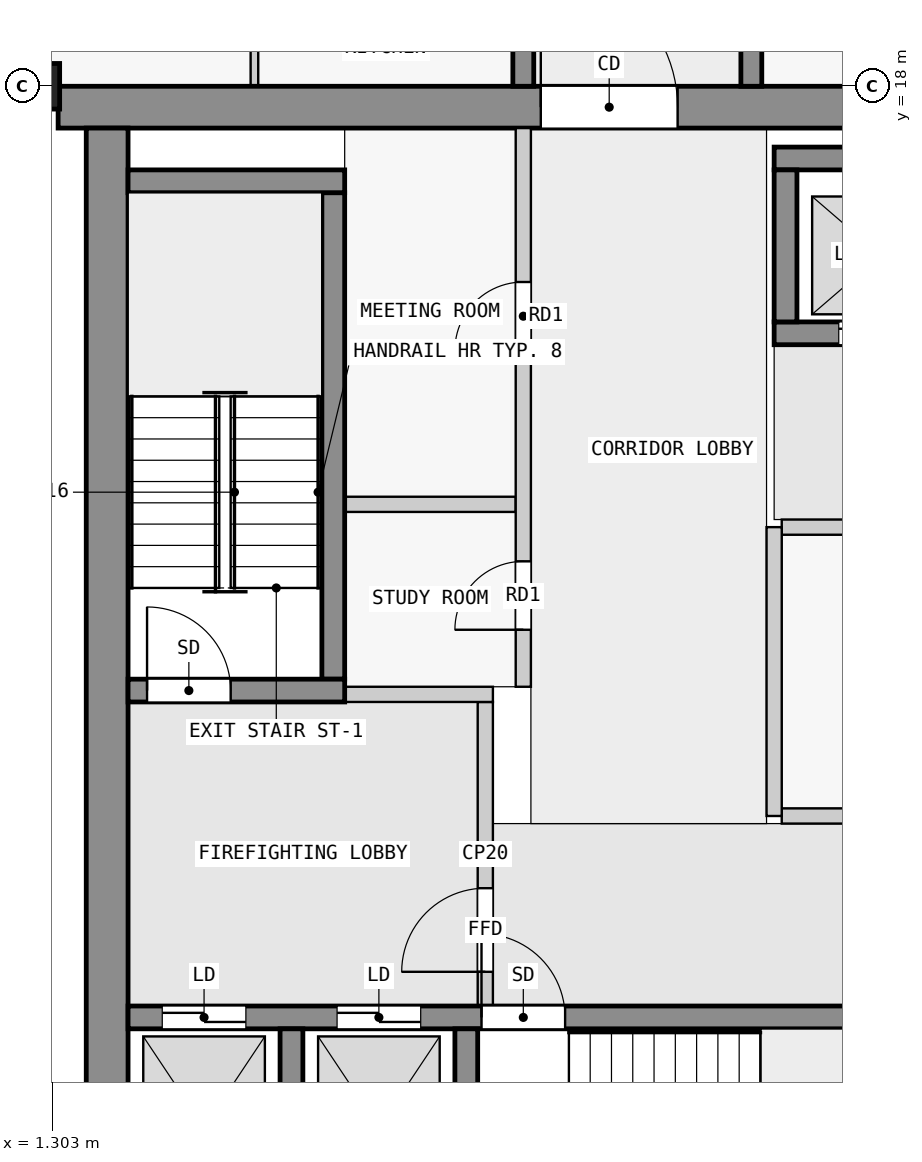
"""IFC4 building model, lengths in metres.
Left out: names, types, materials, properties, quantities, classifications, styles, units other than length and angle.
Written with IfcOpenShell. Run it as: python <this file> out.ifc"""

import sys

from ifc_helpers import new_model, si_unit, direction, frame, frame_2d, origin, origin_2d, place, context, subcontext, project, spatial, rectangle, extrude, element, fill, save


model = new_model("IFC4")
c1 = context("Model", 3, precision=1e-05, world=origin(), true_north=direction((0.0, 1.0)))
c2 = subcontext(c1, "Body", "Model", "MODEL_VIEW")
j1 = project(units=[si_unit("LENGTHUNIT", "METRE"), si_unit("PLANEANGLEUNIT", "RADIAN")], contexts=[c1])
p1 = place(None, origin())
s1 = spatial("IfcSite", under=j1, at=p1, CompositionType="ELEMENT")
p2 = place(p1, origin())
s2 = spatial("IfcBuilding", under=s1, at=p2, CompositionType="ELEMENT")
p3 = place(p2, frame((0.0, 0.0, 208.4)))
s3 = spatial("IfcBuildingStorey", under=s2, at=p3, CompositionType="ELEMENT", Elevation=208.4)
p4 = place(p3, frame((0.7, 18.0, 0.0), z_axis=(0.0, 0.0, 1.0), x_axis=(0.0, 1.0, 0.0)))
e1 = element("IfcColumn", 1, at=p4, inside=s3, PredefinedType="COLUMN", context=c2, shape_type="SweptSolid", body=[
    extrude(rectangle(XDim=0.6, YDim=1.4, at=origin_2d()), origin(), (0.0, 0.0, 1.0), 3.5),
])
p5 = place(p3, frame((1.38, 17.725, 0.0), z_axis=(0.0, 0.0, 1.0), x_axis=(1.0, 0.0, 0.0)))
e2 = element("IfcWall", 2, at=p5, inside=s3, PredefinedType="SHEAR", context=c2, shape_type="SweptSolid", body=[
    extrude(rectangle(XDim=21.12, YDim=0.55, at=frame_2d((10.56, 0.0))), origin(), (0.0, 0.0, 1.0), 3.25),
])
p6 = place(p5, frame((6.35, 0.0, 0.0)))
e3 = element("IfcOpeningElement", 3, at=p6, cuts=e2, PredefinedType="OPENING", context=c2, shape_type="SweptSolid", body=[
    extrude(rectangle(XDim=1.8, YDim=2.1, at=frame_2d((0.9, 1.05))), frame((0.0, 0.285, 0.0), z_axis=(0.0, -1.0, 0.0), x_axis=(1.0, 0.0, 0.0)), (0.0, 0.0, 1.0), 0.57),
])
p7 = place(p3, frame((2.025, 2.5, 0.0), z_axis=(0.0, 0.0, 1.0), x_axis=(0.0, 1.0, 0.0)))
e4 = element("IfcWall", 4, at=p7, inside=s3, PredefinedType="SHEAR", context=c2, shape_type="SweptSolid", body=[
    extrude(rectangle(XDim=14.95, YDim=0.55, at=frame_2d((7.475, 0.0))), origin(), (0.0, 0.0, 1.0), 3.25),
])
for number, where, z_axis, x_axis in (
    (5, (4.45, 2.8, 0.0), (0.0, 0.0, 1.0), (0.0, 1.0, 0.0)),
    (6, (6.75, 2.8, 0.0), (0.0, 0.0, 1.0), (0.0, 1.0, 0.0)),
):
    element("IfcWall", number, at=place(p3, frame(where, z_axis=z_axis, x_axis=x_axis)), inside=s3, PredefinedType="SHEAR", context=c2, shape_type="SweptSolid", body=[
        extrude(rectangle(XDim=2.8, YDim=0.3, at=frame_2d((1.4, 0.0))), origin(), (0.0, 0.0, 1.0), 3.25),
    ])
p8 = place(p3, frame((2.3, 5.75, 0.0), z_axis=(0.0, 0.0, 1.0), x_axis=(1.0, 0.0, 0.0)))
e7 = element("IfcWall", 7, at=p8, inside=s3, PredefinedType="SHEAR", context=c2, shape_type="SweptSolid", body=[
    extrude(rectangle(XDim=18.8, YDim=0.3, at=frame_2d((9.4, 0.0))), origin(), (0.0, 0.0, 1.0), 3.25),
])
p9 = place(p8, frame((4.65, 0.0, 0.0)))
e8 = element("IfcOpeningElement", 8, at=p9, cuts=e7, PredefinedType="OPENING", context=c2, shape_type="SweptSolid", body=[
    extrude(rectangle(XDim=1.1, YDim=2.1, at=frame_2d((0.55, 1.05))), frame((0.0, 0.16, 0.0), z_axis=(0.0, -1.0, 0.0), x_axis=(1.0, 0.0, 0.0)), (0.0, 0.0, 1.0), 0.32),
])
p10 = place(p8, frame((0.45, 0.0, 0.0)))
e9 = element("IfcOpeningElement", 9, at=p10, cuts=e7, PredefinedType="OPENING", context=c2, shape_type="SweptSolid", body=[
    extrude(rectangle(XDim=1.1, YDim=2.1, at=frame_2d((0.55, 1.05))), frame((0.0, 0.16, 0.0), z_axis=(0.0, -1.0, 0.0), x_axis=(1.0, 0.0, 0.0)), (0.0, 0.0, 1.0), 0.32),
])
p11 = place(p8, frame((2.75, 0.0, 0.0)))
e10 = element("IfcOpeningElement", 10, at=p11, cuts=e7, PredefinedType="OPENING", context=c2, shape_type="SweptSolid", body=[
    extrude(rectangle(XDim=1.1, YDim=2.1, at=frame_2d((0.55, 1.05))), frame((0.0, 0.16, 0.0), z_axis=(0.0, -1.0, 0.0), x_axis=(1.0, 0.0, 0.0)), (0.0, 0.0, 1.0), 0.32),
])
p12 = place(p8, frame((13.2, 0.0, 0.0)))
e11 = element("IfcOpeningElement", 11, at=p12, cuts=e7, PredefinedType="OPENING", context=c2, shape_type="SweptSolid", body=[
    extrude(rectangle(XDim=0.9, YDim=2.1, at=frame_2d((0.45, 1.05))), frame((0.0, 0.16, 0.0), z_axis=(0.0, -1.0, 0.0), x_axis=(1.0, 0.0, 0.0)), (0.0, 0.0, 1.0), 0.32),
])
p13 = place(p8, frame((16.95, 0.0, 0.0)))
e12 = element("IfcOpeningElement", 12, at=p13, cuts=e7, PredefinedType="OPENING", context=c2, shape_type="SweptSolid", body=[
    extrude(rectangle(XDim=0.9, YDim=2.1, at=frame_2d((0.45, 1.05))), frame((0.0, 0.16, 0.0), z_axis=(0.0, -1.0, 0.0), x_axis=(1.0, 0.0, 0.0)), (0.0, 0.0, 1.0), 0.32),
])
p14 = place(p3, frame((2.3, 10.05, 0.0), z_axis=(0.0, 0.0, 1.0), x_axis=(1.0, 0.0, 0.0)))
e13 = element("IfcWall", 13, at=p14, inside=s3, PredefinedType="SHEAR", context=c2, shape_type="SweptSolid", body=[
    extrude(rectangle(XDim=2.85, YDim=0.3, at=frame_2d((1.425, 0.0))), origin(), (0.0, 0.0, 1.0), 3.25),
])
p15 = place(p14, frame((0.25, 0.0, 0.0)))
e14 = element("IfcOpeningElement", 14, at=p15, cuts=e13, PredefinedType="OPENING", context=c2, shape_type="SweptSolid", body=[
    extrude(rectangle(XDim=1.1, YDim=2.1, at=frame_2d((0.55, 1.05))), frame((0.0, 0.16, 0.0), z_axis=(0.0, -1.0, 0.0), x_axis=(1.0, 0.0, 0.0)), (0.0, 0.0, 1.0), 0.32),
])
p16 = place(p3, frame((5.0, 10.2, 0.0), z_axis=(0.0, 0.0, 1.0), x_axis=(0.0, 1.0, 0.0)))
e15 = element("IfcWall", 15, at=p16, inside=s3, PredefinedType="SHEAR", context=c2, shape_type="SweptSolid", body=[
    extrude(rectangle(XDim=6.4, YDim=0.3, at=frame_2d((3.2, 0.0))), origin(), (0.0, 0.0, 1.0), 3.25),
])
p17 = place(p3, frame((2.3, 16.75, 0.0), z_axis=(0.0, 0.0, 1.0), x_axis=(1.0, 0.0, 0.0)))
e16 = element("IfcWall", 16, at=p17, inside=s3, PredefinedType="SHEAR", context=c2, shape_type="SweptSolid", body=[
    extrude(rectangle(XDim=2.85, YDim=0.3, at=frame_2d((1.425, 0.0))), origin(), (0.0, 0.0, 1.0), 3.25),
])
p18 = place(p3, frame((10.8, 17.05, 0.0), z_axis=(0.0, 0.0, 1.0), x_axis=(1.0, 0.0, 0.0)))
e17 = element("IfcWall", 17, at=p18, inside=s3, PredefinedType="SHEAR", context=c2, shape_type="SweptSolid", body=[
    extrude(rectangle(XDim=7.8, YDim=0.3, at=frame_2d((3.9, 0.0))), origin(), (0.0, 0.0, 1.0), 3.25),
])
p19 = place(p3, frame((10.8, 14.75, 0.0), z_axis=(0.0, 0.0, 1.0), x_axis=(1.0, 0.0, 0.0)))
e18 = element("IfcWall", 18, at=p19, inside=s3, PredefinedType="SHEAR", context=c2, shape_type="SweptSolid", body=[
    extrude(rectangle(XDim=7.8, YDim=0.3, at=frame_2d((3.9, 0.0))), origin(), (0.0, 0.0, 1.0), 3.25),
])
p20 = place(p19, frame((0.85, 0.0, 0.0)))
e19 = element("IfcOpeningElement", 19, at=p20, cuts=e18, PredefinedType="OPENING", context=c2, shape_type="SweptSolid", body=[
    extrude(rectangle(XDim=1.1, YDim=2.1, at=frame_2d((0.55, 1.05))), frame((0.0, 0.16, 0.0), z_axis=(0.0, -1.0, 0.0), x_axis=(1.0, 0.0, 0.0)), (0.0, 0.0, 1.0), 0.32),
])
p21 = place(p19, frame((3.35, 0.0, 0.0)))
e20 = element("IfcOpeningElement", 20, at=p21, cuts=e18, PredefinedType="OPENING", context=c2, shape_type="SweptSolid", body=[
    extrude(rectangle(XDim=1.1, YDim=2.1, at=frame_2d((0.55, 1.05))), frame((0.0, 0.16, 0.0), z_axis=(0.0, -1.0, 0.0), x_axis=(1.0, 0.0, 0.0)), (0.0, 0.0, 1.0), 0.32),
])
p22 = place(p19, frame((5.85, 0.0, 0.0)))
e21 = element("IfcOpeningElement", 21, at=p22, cuts=e18, PredefinedType="OPENING", context=c2, shape_type="SweptSolid", body=[
    extrude(rectangle(XDim=1.1, YDim=2.1, at=frame_2d((0.55, 1.05))), frame((0.0, 0.16, 0.0), z_axis=(0.0, -1.0, 0.0), x_axis=(1.0, 0.0, 0.0)), (0.0, 0.0, 1.0), 0.32),
])
p23 = place(p3, frame((10.95, 14.9, 0.0), z_axis=(0.0, 0.0, 1.0), x_axis=(0.0, 1.0, 0.0)))
e22 = element("IfcWall", 22, at=p23, inside=s3, PredefinedType="SHEAR", context=c2, shape_type="SweptSolid", body=[
    extrude(rectangle(XDim=2.0, YDim=0.3, at=frame_2d((1.0, 0.0))), origin(), (0.0, 0.0, 1.0), 3.25),
])
p24 = place(p3, frame((7.5, 18.0, 0.0), z_axis=(0.0, 0.0, 1.0), x_axis=(0.0, 1.0, 0.0)))
e23 = element("IfcWall", 23, at=p24, inside=s3, PredefinedType="SHEAR", context=c2, shape_type="SweptSolid", body=[
    extrude(rectangle(XDim=27.0, YDim=0.275, at=frame_2d((13.5, 0.0))), origin(), (0.0, 0.0, 1.0), 3.25),
])
p25 = place(p24, frame((1.75, 0.0, 0.0)))
e24 = element("IfcOpeningElement", 24, at=p25, cuts=e23, PredefinedType="OPENING", context=c2, shape_type="SweptSolid", body=[
    extrude(rectangle(XDim=1.0, YDim=2.1, at=frame_2d((0.5, 1.05))), frame((0.0, 0.147, 0.0), z_axis=(0.0, -1.0, 0.0), x_axis=(1.0, 0.0, 0.0)), (0.0, 0.0, 1.0), 0.295),
])
p26 = place(p24, frame((5.85, 0.0, 0.0)))
e25 = element("IfcOpeningElement", 25, at=p26, cuts=e23, PredefinedType="OPENING", context=c2, shape_type="SweptSolid", body=[
    extrude(rectangle(XDim=1.8, YDim=2.1, at=frame_2d((0.9, 1.05))), frame((0.0, 0.147, 0.0), z_axis=(0.0, -1.0, 0.0), x_axis=(1.0, 0.0, 0.0)), (0.0, 0.0, 1.0), 0.295),
])
p27 = place(p24, frame((13.05, 0.0, 0.0)))
e26 = element("IfcOpeningElement", 26, at=p27, cuts=e23, PredefinedType="OPENING", context=c2, shape_type="SweptSolid", body=[
    extrude(rectangle(XDim=1.0, YDim=2.1, at=frame_2d((0.5, 1.05))), frame((0.0, 0.147, 0.0), z_axis=(0.0, -1.0, 0.0), x_axis=(1.0, 0.0, 0.0)), (0.0, 0.0, 1.0), 0.295),
])
p28 = place(p24, frame((19.75, 0.0, 0.0)))
e27 = element("IfcOpeningElement", 27, at=p28, cuts=e23, PredefinedType="OPENING", context=c2, shape_type="SweptSolid", body=[
    extrude(rectangle(XDim=1.0, YDim=2.1, at=frame_2d((0.5, 1.05))), frame((0.0, 0.147, 0.0), z_axis=(0.0, -1.0, 0.0), x_axis=(1.0, 0.0, 0.0)), (0.0, 0.0, 1.0), 0.295),
])
p29 = place(p24, frame((23.25, 0.0, 0.0)))
e28 = element("IfcOpeningElement", 28, at=p29, cuts=e23, PredefinedType="OPENING", context=c2, shape_type="SweptSolid", body=[
    extrude(rectangle(XDim=0.9, YDim=2.1, at=frame_2d((0.45, 1.05))), frame((0.0, 0.147, 0.0), z_axis=(0.0, -1.0, 0.0), x_axis=(1.0, 0.0, 0.0)), (0.0, 0.0, 1.0), 0.295),
])
p30 = place(p24, frame((25.45, 0.0, 0.0)))
e29 = element("IfcOpeningElement", 29, at=p30, cuts=e23, PredefinedType="OPENING", context=c2, shape_type="SweptSolid", body=[
    extrude(rectangle(XDim=1.0, YDim=2.1, at=frame_2d((0.5, 1.05))), frame((0.0, 0.147, 0.0), z_axis=(0.0, -1.0, 0.0), x_axis=(1.0, 0.0, 0.0)), (0.0, 0.0, 1.0), 0.295),
])
p31 = place(p3, frame((10.5, 18.0, 0.0), z_axis=(0.0, 0.0, 1.0), x_axis=(0.0, 1.0, 0.0)))
e30 = element("IfcWall", 30, at=p31, inside=s3, PredefinedType="SHEAR", context=c2, shape_type="SweptSolid", body=[
    extrude(rectangle(XDim=27.0, YDim=0.275, at=frame_2d((13.5, 0.0))), origin(), (0.0, 0.0, 1.0), 3.25),
])
p32 = place(p31, frame((4.85, 0.0, 0.0)))
e31 = element("IfcOpeningElement", 31, at=p32, cuts=e30, PredefinedType="OPENING", context=c2, shape_type="SweptSolid", body=[
    extrude(rectangle(XDim=1.0, YDim=2.1, at=frame_2d((0.5, 1.05))), frame((0.0, 0.147, 0.0), z_axis=(0.0, -1.0, 0.0), x_axis=(1.0, 0.0, 0.0)), (0.0, 0.0, 1.0), 0.295),
])
p33 = place(p31, frame((15.25, 0.0, 0.0)))
e32 = element("IfcOpeningElement", 32, at=p33, cuts=e30, PredefinedType="OPENING", context=c2, shape_type="SweptSolid", body=[
    extrude(rectangle(XDim=1.0, YDim=2.1, at=frame_2d((0.5, 1.05))), frame((0.0, 0.147, 0.0), z_axis=(0.0, -1.0, 0.0), x_axis=(1.0, 0.0, 0.0)), (0.0, 0.0, 1.0), 0.295),
])
p34 = place(p31, frame((21.35, 0.0, 0.0)))
e33 = element("IfcOpeningElement", 33, at=p34, cuts=e30, PredefinedType="OPENING", context=c2, shape_type="SweptSolid", body=[
    extrude(rectangle(XDim=1.0, YDim=2.1, at=frame_2d((0.5, 1.05))), frame((0.0, 0.147, 0.0), z_axis=(0.0, -1.0, 0.0), x_axis=(1.0, 0.0, 0.0)), (0.0, 0.0, 1.0), 0.295),
])
p35 = place(p3, frame((7.0, 5.9, 0.0), z_axis=(0.0, 0.0, 1.0), x_axis=(0.0, 1.0, 0.0)))
e34 = element("IfcWall", 34, at=p35, inside=s3, PredefinedType="PARTITIONING", context=c2, shape_type="SweptSolid", body=[
    extrude(rectangle(XDim=4.0, YDim=0.2, at=frame_2d((2.0, 0.0))), origin(), (0.0, 0.0, 1.0), 3.25),
])
p36 = place(p35, frame((0.45, 0.0, 0.0)))
e35 = element("IfcOpeningElement", 35, at=p36, cuts=e34, PredefinedType="OPENING", context=c2, shape_type="SweptSolid", body=[
    extrude(rectangle(XDim=1.1, YDim=2.1, at=frame_2d((0.55, 1.05))), frame((0.0, 0.11, 0.0), z_axis=(0.0, -1.0, 0.0), x_axis=(1.0, 0.0, 0.0)), (0.0, 0.0, 1.0), 0.22),
])
p37 = place(p3, frame((5.15, 10.0, 0.0), z_axis=(0.0, 0.0, 1.0), x_axis=(1.0, 0.0, 0.0)))
e36 = element("IfcWall", 36, at=p37, inside=s3, PredefinedType="PARTITIONING", context=c2, shape_type="SweptSolid", body=[
    extrude(rectangle(XDim=1.95, YDim=0.2, at=frame_2d((0.975, 0.0))), origin(), (0.0, 0.0, 1.0), 3.25),
])
p38 = place(p3, frame((10.8, 8.4, 0.0), z_axis=(0.0, 0.0, 1.0), x_axis=(0.0, 1.0, 0.0)))
e37 = element("IfcWall", 37, at=p38, inside=s3, PredefinedType="PARTITIONING", context=c2, shape_type="SweptSolid", body=[
    extrude(rectangle(XDim=3.8, YDim=0.2, at=frame_2d((1.9, 0.0))), origin(), (0.0, 0.0, 1.0), 3.25),
])
p39 = place(p3, frame((10.9, 8.4, 0.0), z_axis=(0.0, 0.0, 1.0), x_axis=(1.0, 0.0, 0.0)))
e38 = element("IfcWall", 38, at=p39, inside=s3, PredefinedType="PARTITIONING", context=c2, shape_type="SweptSolid", body=[
    extrude(rectangle(XDim=8.55, YDim=0.2, at=frame_2d((4.275, 0.0))), origin(), (0.0, 0.0, 1.0), 3.25),
])
p40 = place(p3, frame((10.9, 12.2, 0.0), z_axis=(0.0, 0.0, 1.0), x_axis=(1.0, 0.0, 0.0)))
e39 = element("IfcWall", 39, at=p40, inside=s3, PredefinedType="PARTITIONING", context=c2, shape_type="SweptSolid", body=[
    extrude(rectangle(XDim=8.55, YDim=0.2, at=frame_2d((4.275, 0.0))), origin(), (0.0, 0.0, 1.0), 3.25),
])
p41 = place(p40, frame((3.825, 0.0, 0.0)))
e40 = element("IfcOpeningElement", 40, at=p41, cuts=e39, PredefinedType="OPENING", context=c2, shape_type="SweptSolid", body=[
    extrude(rectangle(XDim=0.9, YDim=2.1, at=frame_2d((0.45, 1.05))), frame((0.0, 0.11, 0.0), z_axis=(0.0, -1.0, 0.0), x_axis=(1.0, 0.0, 0.0)), (0.0, 0.0, 1.0), 0.22),
])
p42 = place(p3, frame((7.5, 10.1, 0.0), z_axis=(0.0, 0.0, 1.0), x_axis=(0.0, 1.0, 0.0)))
e41 = element("IfcWall", 41, at=p42, inside=s3, PredefinedType="PARTITIONING", context=c2, shape_type="SweptSolid", body=[
    extrude(rectangle(XDim=7.35, YDim=0.2, at=frame_2d((3.675, 0.0))), origin(), (0.0, 0.0, 1.0), 3.25),
])
p43 = place(p42, frame((0.75, 0.0, 0.0)))
e42 = element("IfcOpeningElement", 42, at=p43, cuts=e41, PredefinedType="OPENING", context=c2, shape_type="SweptSolid", body=[
    extrude(rectangle(XDim=0.9, YDim=2.1, at=frame_2d((0.45, 1.05))), frame((0.0, 0.11, 0.0), z_axis=(0.0, -1.0, 0.0), x_axis=(1.0, 0.0, 0.0)), (0.0, 0.0, 1.0), 0.22),
])
p44 = place(p42, frame((4.425, 0.0, 0.0)))
e43 = element("IfcOpeningElement", 43, at=p44, cuts=e41, PredefinedType="OPENING", context=c2, shape_type="SweptSolid", body=[
    extrude(rectangle(XDim=0.9, YDim=2.1, at=frame_2d((0.45, 1.05))), frame((0.0, 0.11, 0.0), z_axis=(0.0, -1.0, 0.0), x_axis=(1.0, 0.0, 0.0)), (0.0, 0.0, 1.0), 0.22),
])
p45 = place(p3, frame((5.15, 12.5, 0.0), z_axis=(0.0, 0.0, 1.0), x_axis=(1.0, 0.0, 0.0)))
e44 = element("IfcWall", 44, at=p45, inside=s3, PredefinedType="PARTITIONING", context=c2, shape_type="SweptSolid", body=[
    extrude(rectangle(XDim=2.25, YDim=0.2, at=frame_2d((1.125, 0.0))), origin(), (0.0, 0.0, 1.0), 3.25),
])
p46 = place(p3, frame((3.962, 19.45, 0.0), z_axis=(0.0, 0.0, 1.0), x_axis=(0.0, -1.0, 0.0)))
e45 = element("IfcWall", 45, at=p46, inside=s3, PredefinedType="PARTITIONING", context=c2, shape_type="SweptSolid", body=[
    extrude(rectangle(XDim=1.45, YDim=0.1, at=frame_2d((0.725, 0.0))), origin(), (0.0, 0.0, 1.0), 3.25),
])
p47 = place(p36, origin())
e46 = element("IfcDoor", 46, at=p47, inside=s3, OperationType="SINGLE_SWING_LEFT", PredefinedType="DOOR", context=c2, shape_type="SweptSolid", body=[
    extrude(rectangle(XDim=1.1, YDim=2.1, at=frame_2d((0.55, 1.05))), frame((0.0, 0.025, 0.0), z_axis=(0.0, -1.0, 0.0), x_axis=(1.0, 0.0, 0.0)), (0.0, 0.0, 1.0), 0.05),
])
fill(e35, e46)
p48 = place(p15, origin())
e47 = element("IfcDoor", 47, at=p48, inside=s3, OperationType="SINGLE_SWING_RIGHT", PredefinedType="DOOR", context=c2, shape_type="SweptSolid", body=[
    extrude(rectangle(XDim=1.1, YDim=2.1, at=frame_2d((0.55, 1.05))), frame((0.0, 0.025, 0.0), z_axis=(0.0, -1.0, 0.0), x_axis=(1.0, 0.0, 0.0)), (0.0, 0.0, 1.0), 0.05),
])
fill(e14, e47)
p49 = place(p9, origin())
e48 = element("IfcDoor", 48, at=p49, inside=s3, OperationType="SINGLE_SWING_LEFT", PredefinedType="DOOR", context=c2, shape_type="SweptSolid", body=[
    extrude(rectangle(XDim=1.1, YDim=2.1, at=frame_2d((0.55, 1.05))), frame((0.0, 0.025, 0.0), z_axis=(0.0, -1.0, 0.0), x_axis=(1.0, 0.0, 0.0)), (0.0, 0.0, 1.0), 0.05),
])
fill(e8, e48)
p50 = place(p10, origin())
e49 = element("IfcDoor", 49, at=p50, inside=s3, OperationType="DOUBLE_DOOR_SLIDING", PredefinedType="DOOR", context=c2, shape_type="SweptSolid", body=[
    extrude(rectangle(XDim=1.1, YDim=2.1, at=frame_2d((0.55, 1.05))), frame((0.0, 0.025, 0.0), z_axis=(0.0, -1.0, 0.0), x_axis=(1.0, 0.0, 0.0)), (0.0, 0.0, 1.0), 0.05),
])
fill(e9, e49)
p51 = place(p11, origin())
e50 = element("IfcDoor", 50, at=p51, inside=s3, OperationType="DOUBLE_DOOR_SLIDING", PredefinedType="DOOR", context=c2, shape_type="SweptSolid", body=[
    extrude(rectangle(XDim=1.1, YDim=2.1, at=frame_2d((0.55, 1.05))), frame((0.0, 0.025, 0.0), z_axis=(0.0, -1.0, 0.0), x_axis=(1.0, 0.0, 0.0)), (0.0, 0.0, 1.0), 0.05),
])
fill(e10, e50)
p52 = place(p20, origin())
e51 = element("IfcDoor", 51, at=p52, inside=s3, OperationType="DOUBLE_DOOR_SLIDING", PredefinedType="DOOR", context=c2, shape_type="SweptSolid", body=[
    extrude(rectangle(XDim=1.1, YDim=2.1, at=frame_2d((0.55, 1.05))), frame((0.0, 0.025, 0.0), z_axis=(0.0, -1.0, 0.0), x_axis=(1.0, 0.0, 0.0)), (0.0, 0.0, 1.0), 0.05),
])
fill(e19, e51)
p53 = place(p6, origin())
e52 = element("IfcDoor", 52, at=p53, inside=s3, OperationType="DOUBLE_DOOR_SINGLE_SWING", PredefinedType="DOOR", context=c2, shape_type="SweptSolid", body=[
    extrude(rectangle(XDim=1.8, YDim=2.1, at=frame_2d((0.9, 1.05))), frame((0.0, 0.025, 0.0), z_axis=(0.0, -1.0, 0.0), x_axis=(1.0, 0.0, 0.0)), (0.0, 0.0, 1.0), 0.05),
])
fill(e3, e52)
p54 = place(p43, origin())
e53 = element("IfcDoor", 53, at=p54, inside=s3, OperationType="SINGLE_SWING_RIGHT", PredefinedType="DOOR", context=c2, shape_type="SweptSolid", body=[
    extrude(rectangle(XDim=0.9, YDim=2.1, at=frame_2d((0.45, 1.05))), frame((0.0, 0.025, 0.0), z_axis=(0.0, -1.0, 0.0), x_axis=(1.0, 0.0, 0.0)), (0.0, 0.0, 1.0), 0.05),
])
fill(e42, e53)
p55 = place(p44, origin())
e54 = element("IfcDoor", 54, at=p55, inside=s3, OperationType="SINGLE_SWING_RIGHT", PredefinedType="DOOR", context=c2, shape_type="SweptSolid", body=[
    extrude(rectangle(XDim=0.9, YDim=2.1, at=frame_2d((0.45, 1.05))), frame((0.0, 0.025, 0.0), z_axis=(0.0, -1.0, 0.0), x_axis=(1.0, 0.0, 0.0)), (0.0, 0.0, 1.0), 0.05),
])
fill(e43, e54)
save(model, sys.argv[1])
